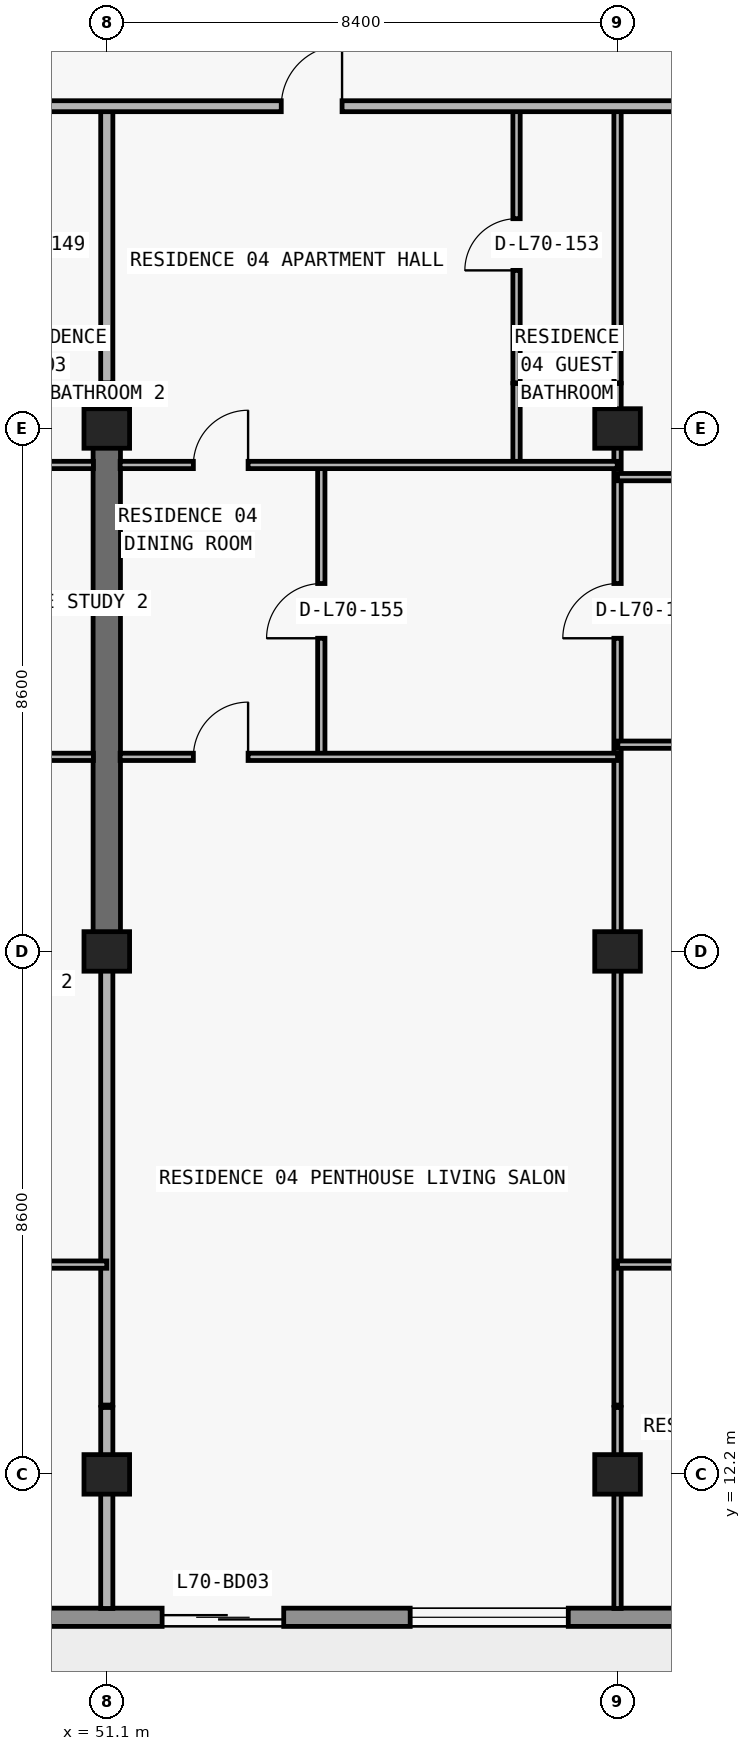
"""IFC4 building model, lengths in metres.
Left out: names, types, materials, properties, quantities, classifications, styles, units other than length and angle.
Written with IfcOpenShell. Run it as: python <this file> out.ifc"""

import sys

from ifc_helpers import new_model, si_unit, direction, frame, frame_2d, origin, origin_2d, place, context, subcontext, project, spatial, rectangle, extrude, element, fill, save


model = new_model("IFC4")
c1 = context("Model", 3, precision=1e-05, world=origin(), true_north=direction((0.0, 1.0)))
c2 = subcontext(c1, "Body", "Model", "MODEL_VIEW")
j1 = project(units=[si_unit("LENGTHUNIT", "METRE"), si_unit("PLANEANGLEUNIT", "RADIAN")], contexts=[c1])
p1 = place(None, origin())
s1 = spatial("IfcSite", under=j1, at=p1, CompositionType="ELEMENT")
p2 = place(p1, origin())
s2 = spatial("IfcBuilding", under=s1, at=p2, CompositionType="ELEMENT")
p3 = place(p2, frame((0.0, 0.0, 249.6)))
s3 = spatial("IfcBuildingStorey", under=s2, at=p3, CompositionType="ELEMENT", Elevation=249.6)
for number, where, z_axis, x_axis in (
    (1, (51.1, 12.2, 0.0), (0.0, 0.0, 1.0), (1.0, 0.0, 0.0)),
    (2, (59.5, 12.2, 0.0), (0.0, 0.0, 1.0), (1.0, 0.0, 0.0)),
    (3, (51.1, 20.8, 0.0), (0.0, 0.0, 1.0), (1.0, 0.0, 0.0)),
    (4, (59.5, 20.8, 0.0), (0.0, 0.0, 1.0), (1.0, 0.0, 0.0)),
    (5, (51.1, 29.4, 0.0), (0.0, 0.0, 1.0), (1.0, 0.0, 0.0)),
    (6, (59.5, 29.4, 0.0), (0.0, 0.0, 1.0), (1.0, 0.0, 0.0)),
):
    element("IfcColumn", number, at=place(p3, frame(where, z_axis=z_axis, x_axis=x_axis)), inside=s3, PredefinedType="COLUMN", context=c2, shape_type="SweptSolid", body=[
        extrude(rectangle(XDim=0.75, YDim=0.65, at=origin_2d()), origin(), (0.0, 0.0, 1.0), 3.05),
    ])
p4 = place(p3, frame((51.1, 20.8, 0.0), z_axis=(0.0, 0.0, 1.0), x_axis=(0.0, 1.0, 0.0)))
e7 = element("IfcWall", 7, at=p4, inside=s3, PredefinedType="SHEAR", context=c2, shape_type="SweptSolid", body=[
    extrude(rectangle(XDim=8.6, YDim=0.45, at=frame_2d((4.3, 0.0))), origin(), (0.0, 0.0, 1.0), 3.05),
])
p5 = place(p3, frame((65.7, 9.85, 0.0), z_axis=(0.0, 0.0, 1.0), x_axis=(-1.0, 0.0, 0.0)))
e8 = element("IfcWall", 8, at=p5, inside=s3, PredefinedType="STANDARD", context=c2, shape_type="SweptSolid", body=[
    extrude(rectangle(XDim=53.6, YDim=0.3, at=frame_2d((26.8, 0.0))), origin(), (0.0, 0.0, 1.0), 3.05),
])
p6 = place(p5, frame((48.05, 0.0, 0.85)))
e9 = element("IfcOpeningElement", 9, at=p6, cuts=e8, PredefinedType="OPENING", context=c2, shape_type="SweptSolid", body=[
    extrude(rectangle(XDim=1.8, YDim=1.55, at=frame_2d((0.9, 0.775))), frame((0.0, 0.16, 0.0), z_axis=(0.0, -1.0, 0.0), x_axis=(1.0, 0.0, 0.0)), (0.0, 0.0, 1.0), 0.32),
])
p7 = place(p5, frame((44.09, 0.0, 0.0)))
e10 = element("IfcOpeningElement", 10, at=p7, cuts=e8, PredefinedType="OPENING", context=c2, shape_type="SweptSolid", body=[
    extrude(rectangle(XDim=2.0, YDim=2.3, at=frame_2d((1.0, 1.15))), frame((0.0, 0.16, 0.0), z_axis=(0.0, -1.0, 0.0), x_axis=(1.0, 0.0, 0.0)), (0.0, 0.0, 1.0), 0.32),
])
p8 = place(p5, frame((39.99, 0.0, 0.85)))
e11 = element("IfcOpeningElement", 11, at=p8, cuts=e8, PredefinedType="OPENING", context=c2, shape_type="SweptSolid", body=[
    extrude(rectangle(XDim=1.8, YDim=1.55, at=frame_2d((0.9, 0.775))), frame((0.0, 0.16, 0.0), z_axis=(0.0, -1.0, 0.0), x_axis=(1.0, 0.0, 0.0)), (0.0, 0.0, 1.0), 0.32),
])
p9 = place(p5, frame((36.09, 0.0, 0.0)))
e12 = element("IfcOpeningElement", 12, at=p9, cuts=e8, PredefinedType="OPENING", context=c2, shape_type="SweptSolid", body=[
    extrude(rectangle(XDim=2.0, YDim=2.3, at=frame_2d((1.0, 1.15))), frame((0.0, 0.16, 0.0), z_axis=(0.0, -1.0, 0.0), x_axis=(1.0, 0.0, 0.0)), (0.0, 0.0, 1.0), 0.32),
])
p10 = place(p5, frame((31.41, 0.0, 0.65)))
e13 = element("IfcOpeningElement", 13, at=p10, cuts=e8, PredefinedType="OPENING", context=c2, shape_type="SweptSolid", body=[
    extrude(rectangle(XDim=2.6, YDim=1.85, at=frame_2d((1.3, 0.925))), frame((0.0, 0.16, 0.0), z_axis=(0.0, -1.0, 0.0), x_axis=(1.0, 0.0, 0.0)), (0.0, 0.0, 1.0), 0.32),
])
p11 = place(p5, frame((25.7, 0.0, 0.85)))
e14 = element("IfcOpeningElement", 14, at=p11, cuts=e8, PredefinedType="OPENING", context=c2, shape_type="SweptSolid", body=[
    extrude(rectangle(XDim=2.2, YDim=1.55, at=frame_2d((1.1, 0.775))), frame((0.0, 0.16, 0.0), z_axis=(0.0, -1.0, 0.0), x_axis=(1.0, 0.0, 0.0)), (0.0, 0.0, 1.0), 0.32),
])
p12 = place(p5, frame((17.7, 0.0, 0.85)))
e15 = element("IfcOpeningElement", 15, at=p12, cuts=e8, PredefinedType="OPENING", context=c2, shape_type="SweptSolid", body=[
    extrude(rectangle(XDim=2.2, YDim=1.55, at=frame_2d((1.1, 0.775))), frame((0.0, 0.16, 0.0), z_axis=(0.0, -1.0, 0.0), x_axis=(1.0, 0.0, 0.0)), (0.0, 0.0, 1.0), 0.32),
])
p13 = place(p5, frame((11.69, 0.0, 0.0)))
e16 = element("IfcOpeningElement", 16, at=p13, cuts=e8, PredefinedType="OPENING", context=c2, shape_type="SweptSolid", body=[
    extrude(rectangle(XDim=2.0, YDim=2.3, at=frame_2d((1.0, 1.15))), frame((0.0, 0.16, 0.0), z_axis=(0.0, -1.0, 0.0), x_axis=(1.0, 0.0, 0.0)), (0.0, 0.0, 1.0), 0.32),
])
p14 = place(p5, frame((7.01, 0.0, 0.65)))
e17 = element("IfcOpeningElement", 17, at=p14, cuts=e8, PredefinedType="OPENING", context=c2, shape_type="SweptSolid", body=[
    extrude(rectangle(XDim=2.6, YDim=1.85, at=frame_2d((1.3, 0.925))), frame((0.0, 0.16, 0.0), z_axis=(0.0, -1.0, 0.0), x_axis=(1.0, 0.0, 0.0)), (0.0, 0.0, 1.0), 0.32),
])
p15 = place(p5, frame((2.0, 0.0, 0.85)))
e18 = element("IfcOpeningElement", 18, at=p15, cuts=e8, PredefinedType="OPENING", context=c2, shape_type="SweptSolid", body=[
    extrude(rectangle(XDim=2.2, YDim=1.55, at=frame_2d((1.1, 0.775))), frame((0.0, 0.16, 0.0), z_axis=(0.0, -1.0, 0.0), x_axis=(1.0, 0.0, 0.0)), (0.0, 0.0, 1.0), 0.32),
])
p16 = place(p3, frame((51.1, 9.995, 0.0), z_axis=(0.0, 0.0, 1.0), x_axis=(0.0, 1.0, 0.0)))
e19 = element("IfcWall", 19, at=p16, inside=s3, PredefinedType="PARTITIONING", context=c2, shape_type="SweptSolid", body=[
    extrude(rectangle(XDim=3.305, YDim=0.2, at=frame_2d((1.652, 0.0))), origin(), (0.0, 0.0, 1.0), 2.263),
])
p17 = place(p3, frame((51.1, 13.34, 0.0), z_axis=(0.0, 0.0, 1.0), x_axis=(0.0, 1.0, 0.0)))
e20 = element("IfcWall", 20, at=p17, inside=s3, PredefinedType="PARTITIONING", context=c2, shape_type="SweptSolid", body=[
    extrude(rectangle(XDim=7.455, YDim=0.2, at=frame_2d((3.728, 0.0))), origin(), (0.0, 0.0, 1.0), 2.263),
])
p18 = place(p3, frame((51.1, 29.405, 0.0), z_axis=(0.0, 0.0, 1.0), x_axis=(0.0, 1.0, 0.0)))
e21 = element("IfcWall", 21, at=p18, inside=s3, PredefinedType="PARTITIONING", context=c2, shape_type="SweptSolid", body=[
    extrude(rectangle(XDim=0.735, YDim=0.2, at=frame_2d((0.367, 0.0))), origin(), (0.0, 0.0, 1.0), 2.335),
])
p19 = place(p3, frame((51.1, 30.15, 0.0), z_axis=(0.0, 0.0, 1.0), x_axis=(0.0, 1.0, 0.0)))
e22 = element("IfcWall", 22, at=p19, inside=s3, PredefinedType="PARTITIONING", context=c2, shape_type="SweptSolid", body=[
    extrude(rectangle(XDim=4.55, YDim=0.2, at=frame_2d((2.275, 0.0))), origin(), (0.0, 0.0, 1.0), 2.335),
])
p20 = place(p3, frame((54.628, 24.0, 0.0), z_axis=(0.0, 0.0, 1.0), x_axis=(0.0, 1.0, 0.0)))
e23 = element("IfcWall", 23, at=p20, inside=s3, PredefinedType="PARTITIONING", context=c2, shape_type="SweptSolid", body=[
    extrude(rectangle(XDim=4.8, YDim=0.12, at=frame_2d((2.4, 0.0))), origin(), (0.0, 0.0, 1.0), 3.05),
])
p21 = place(p20, frame((1.95, 0.0, 0.0)))
e24 = element("IfcOpeningElement", 24, at=p21, cuts=e23, PredefinedType="OPENING", context=c2, shape_type="SweptSolid", body=[
    extrude(rectangle(XDim=0.9, YDim=2.15, at=frame_2d((0.45, 1.075))), frame((0.0, 0.07, 0.0), z_axis=(0.0, -1.0, 0.0), x_axis=(1.0, 0.0, 0.0)), (0.0, 0.0, 1.0), 0.14),
])
p22 = place(p3, frame((57.839, 28.8, 0.0), z_axis=(0.0, 0.0, 1.0), x_axis=(0.0, 1.0, 0.0)))
e25 = element("IfcWall", 25, at=p22, inside=s3, PredefinedType="PARTITIONING", context=c2, shape_type="SweptSolid", body=[
    extrude(rectangle(XDim=1.34, YDim=0.12, at=frame_2d((0.67, 0.0))), origin(), (0.0, 0.0, 1.0), 3.05),
])
p23 = place(p3, frame((57.839, 30.15, 0.0), z_axis=(0.0, 0.0, 1.0), x_axis=(0.0, 1.0, 0.0)))
e26 = element("IfcWall", 26, at=p23, inside=s3, PredefinedType="PARTITIONING", context=c2, shape_type="SweptSolid", body=[
    extrude(rectangle(XDim=4.55, YDim=0.12, at=frame_2d((2.275, 0.0))), origin(), (0.0, 0.0, 1.0), 3.05),
])
p24 = place(p23, frame((1.85, 0.0, 0.0)))
e27 = element("IfcOpeningElement", 27, at=p24, cuts=e26, PredefinedType="OPENING", context=c2, shape_type="SweptSolid", body=[
    extrude(rectangle(XDim=0.85, YDim=2.1, at=frame_2d((0.425, 1.05))), frame((0.0, 0.07, 0.0), z_axis=(0.0, -1.0, 0.0), x_axis=(1.0, 0.0, 0.0)), (0.0, 0.0, 1.0), 0.14),
])
p25 = place(p3, frame((59.5, 9.995, 0.0), z_axis=(0.0, 0.0, 1.0), x_axis=(0.0, 1.0, 0.0)))
e28 = element("IfcWall", 28, at=p25, inside=s3, PredefinedType="PARTITIONING", context=c2, shape_type="SweptSolid", body=[
    extrude(rectangle(XDim=3.305, YDim=0.12, at=frame_2d((1.652, 0.0))), origin(), (0.0, 0.0, 1.0), 2.263),
])
p26 = place(p3, frame((59.5, 13.34, 0.0), z_axis=(0.0, 0.0, 1.0), x_axis=(0.0, 1.0, 0.0)))
e29 = element("IfcWall", 29, at=p26, inside=s3, PredefinedType="PARTITIONING", context=c2, shape_type="SweptSolid", body=[
    extrude(rectangle(XDim=16.8, YDim=0.12, at=frame_2d((8.4, 0.0))), origin(), (0.0, 0.0, 1.0), 2.263),
])
p27 = place(p26, frame((12.61, 0.0, 0.0)))
e30 = element("IfcOpeningElement", 30, at=p27, cuts=e29, PredefinedType="OPENING", context=c2, shape_type="SweptSolid", body=[
    extrude(rectangle(XDim=0.9, YDim=2.15, at=frame_2d((0.45, 1.075))), frame((0.0, 0.07, 0.0), z_axis=(0.0, -1.0, 0.0), x_axis=(1.0, 0.0, 0.0)), (0.0, 0.0, 1.0), 0.14),
])
p28 = place(p3, frame((59.5, 30.15, 0.0), z_axis=(0.0, 0.0, 1.0), x_axis=(0.0, 1.0, 0.0)))
e31 = element("IfcWall", 31, at=p28, inside=s3, PredefinedType="PARTITIONING", context=c2, shape_type="SweptSolid", body=[
    extrude(rectangle(XDim=4.55, YDim=0.12, at=frame_2d((2.275, 0.0))), origin(), (0.0, 0.0, 1.0), 2.263),
])
p29 = place(p3, frame((35.1, 15.65, 0.0), z_axis=(0.0, 0.0, 1.0), x_axis=(1.0, 0.0, 0.0)))
e32 = element("IfcWall", 32, at=p29, inside=s3, PredefinedType="PARTITIONING", context=c2, shape_type="SweptSolid", body=[
    extrude(rectangle(XDim=16.0, YDim=0.12, at=frame_2d((8.0, 0.0))), origin(), (0.0, 0.0, 1.0), 3.05),
])
p30 = place(p29, frame((3.35, 0.0, 0.0)))
e33 = element("IfcOpeningElement", 33, at=p30, cuts=e32, PredefinedType="OPENING", context=c2, shape_type="SweptSolid", body=[
    extrude(rectangle(XDim=0.9, YDim=2.15, at=frame_2d((0.45, 1.075))), frame((0.0, 0.07, 0.0), z_axis=(0.0, -1.0, 0.0), x_axis=(1.0, 0.0, 0.0)), (0.0, 0.0, 1.0), 0.14),
])
p31 = place(p29, frame((11.35, 0.0, 0.0)))
e34 = element("IfcOpeningElement", 34, at=p31, cuts=e32, PredefinedType="OPENING", context=c2, shape_type="SweptSolid", body=[
    extrude(rectangle(XDim=0.9, YDim=2.15, at=frame_2d((0.45, 1.075))), frame((0.0, 0.07, 0.0), z_axis=(0.0, -1.0, 0.0), x_axis=(1.0, 0.0, 0.0)), (0.0, 0.0, 1.0), 0.14),
])
p32 = place(p3, frame((59.5, 15.65, 0.0), z_axis=(0.0, 0.0, 1.0), x_axis=(1.0, 0.0, 0.0)))
e35 = element("IfcWall", 35, at=p32, inside=s3, PredefinedType="PARTITIONING", context=c2, shape_type="SweptSolid", body=[
    extrude(rectangle(XDim=6.2, YDim=0.12, at=frame_2d((3.1, 0.0))), origin(), (0.0, 0.0, 1.0), 3.05),
])
p33 = place(p32, frame((2.65, 0.0, 0.0)))
e36 = element("IfcOpeningElement", 36, at=p33, cuts=e35, PredefinedType="OPENING", context=c2, shape_type="SweptSolid", body=[
    extrude(rectangle(XDim=0.9, YDim=2.15, at=frame_2d((0.45, 1.075))), frame((0.0, 0.07, 0.0), z_axis=(0.0, -1.0, 0.0), x_axis=(1.0, 0.0, 0.0)), (0.0, 0.0, 1.0), 0.14),
])
p34 = place(p3, frame((42.7, 24.0, 0.0), z_axis=(0.0, 0.0, 1.0), x_axis=(1.0, 0.0, 0.0)))
e37 = element("IfcWall", 37, at=p34, inside=s3, PredefinedType="PARTITIONING", context=c2, shape_type="SweptSolid", body=[
    extrude(rectangle(XDim=8.18, YDim=0.12, at=frame_2d((4.09, 0.0))), origin(), (0.0, 0.0, 1.0), 3.05),
])
p35 = place(p34, frame((3.64, 0.0, 0.0)))
e38 = element("IfcOpeningElement", 38, at=p35, cuts=e37, PredefinedType="OPENING", context=c2, shape_type="SweptSolid", body=[
    extrude(rectangle(XDim=0.9, YDim=2.15, at=frame_2d((0.45, 1.075))), frame((0.0, 0.07, 0.0), z_axis=(0.0, -1.0, 0.0), x_axis=(1.0, 0.0, 0.0)), (0.0, 0.0, 1.0), 0.14),
])
p36 = place(p3, frame((51.32, 24.0, 0.0), z_axis=(0.0, 0.0, 1.0), x_axis=(1.0, 0.0, 0.0)))
e39 = element("IfcWall", 39, at=p36, inside=s3, PredefinedType="PARTITIONING", context=c2, shape_type="SweptSolid", body=[
    extrude(rectangle(XDim=8.18, YDim=0.12, at=frame_2d((4.09, 0.0))), origin(), (0.0, 0.0, 1.0), 3.05),
])
p37 = place(p36, frame((1.204, 0.0, 0.0)))
e40 = element("IfcOpeningElement", 40, at=p37, cuts=e39, PredefinedType="OPENING", context=c2, shape_type="SweptSolid", body=[
    extrude(rectangle(XDim=0.9, YDim=2.15, at=frame_2d((0.45, 1.075))), frame((0.0, 0.07, 0.0), z_axis=(0.0, -1.0, 0.0), x_axis=(1.0, 0.0, 0.0)), (0.0, 0.0, 1.0), 0.14),
])
p38 = place(p3, frame((59.505, 24.2, 0.0), z_axis=(0.0, 0.0, 1.0), x_axis=(1.0, 0.0, 0.0)))
e41 = element("IfcWall", 41, at=p38, inside=s3, PredefinedType="PARTITIONING", context=c2, shape_type="SweptSolid", body=[
    extrude(rectangle(XDim=6.195, YDim=0.12, at=frame_2d((3.098, 0.0))), origin(), (0.0, 0.0, 1.0), 3.05),
])
p39 = place(p38, frame((2.647, 0.0, 0.0)))
e42 = element("IfcOpeningElement", 42, at=p39, cuts=e41, PredefinedType="OPENING", context=c2, shape_type="SweptSolid", body=[
    extrude(rectangle(XDim=0.9, YDim=2.15, at=frame_2d((0.45, 1.075))), frame((0.0, 0.07, 0.0), z_axis=(0.0, -1.0, 0.0), x_axis=(1.0, 0.0, 0.0)), (0.0, 0.0, 1.0), 0.14),
])
p40 = place(p3, frame((59.5, 28.6, 0.0), z_axis=(0.0, 0.0, 1.0), x_axis=(1.0, 0.0, 0.0)))
e43 = element("IfcWall", 43, at=p40, inside=s3, PredefinedType="PARTITIONING", context=c2, shape_type="SweptSolid", body=[
    extrude(rectangle(XDim=6.2, YDim=0.12, at=frame_2d((3.1, 0.0))), origin(), (0.0, 0.0, 1.0), 3.05),
])
p41 = place(p40, frame((1.822, 0.0, 0.0)))
e44 = element("IfcOpeningElement", 44, at=p41, cuts=e43, PredefinedType="OPENING", context=c2, shape_type="SweptSolid", body=[
    extrude(rectangle(XDim=0.9, YDim=2.15, at=frame_2d((0.45, 1.075))), frame((0.0, 0.07, 0.0), z_axis=(0.0, -1.0, 0.0), x_axis=(1.0, 0.0, 0.0)), (0.0, 0.0, 1.0), 0.14),
])
p42 = place(p3, frame((42.705, 28.8, 0.0), z_axis=(0.0, 0.0, 1.0), x_axis=(1.0, 0.0, 0.0)))
e45 = element("IfcWall", 45, at=p42, inside=s3, PredefinedType="PARTITIONING", context=c2, shape_type="SweptSolid", body=[
    extrude(rectangle(XDim=8.175, YDim=0.12, at=frame_2d((4.087, 0.0))), origin(), (0.0, 0.0, 1.0), 3.05),
])
p43 = place(p42, frame((2.892, 0.0, 0.0)))
e46 = element("IfcOpeningElement", 46, at=p43, cuts=e45, PredefinedType="OPENING", context=c2, shape_type="SweptSolid", body=[
    extrude(rectangle(XDim=0.9, YDim=2.15, at=frame_2d((0.45, 1.075))), frame((0.0, 0.07, 0.0), z_axis=(0.0, -1.0, 0.0), x_axis=(1.0, 0.0, 0.0)), (0.0, 0.0, 1.0), 0.14),
])
p44 = place(p3, frame((51.32, 28.8, 0.0), z_axis=(0.0, 0.0, 1.0), x_axis=(1.0, 0.0, 0.0)))
e47 = element("IfcWall", 47, at=p44, inside=s3, PredefinedType="PARTITIONING", context=c2, shape_type="SweptSolid", body=[
    extrude(rectangle(XDim=8.175, YDim=0.12, at=frame_2d((4.087, 0.0))), origin(), (0.0, 0.0, 1.0), 3.05),
])
p45 = place(p44, frame((1.204, 0.0, 0.0)))
e48 = element("IfcOpeningElement", 48, at=p45, cuts=e47, PredefinedType="OPENING", context=c2, shape_type="SweptSolid", body=[
    extrude(rectangle(XDim=0.9, YDim=2.15, at=frame_2d((0.45, 1.075))), frame((0.0, 0.07, 0.0), z_axis=(0.0, -1.0, 0.0), x_axis=(1.0, 0.0, 0.0)), (0.0, 0.0, 1.0), 0.14),
])
p46 = place(p3, frame((26.7, 34.7, 0.0), z_axis=(0.0, 0.0, 1.0), x_axis=(1.0, 0.0, 0.0)))
e49 = element("IfcWall", 49, at=p46, inside=s3, PredefinedType="PARTITIONING", context=c2, shape_type="SweptSolid", body=[
    extrude(rectangle(XDim=39.0, YDim=0.18, at=frame_2d((19.5, 0.0))), origin(), (0.0, 0.0, 1.0), 3.05),
])
p47 = place(p46, frame((2.827, 0.0, 0.0)))
e50 = element("IfcOpeningElement", 50, at=p47, cuts=e49, PredefinedType="OPENING", context=c2, shape_type="SweptSolid", body=[
    extrude(rectangle(XDim=1.0, YDim=2.2, at=frame_2d((0.5, 1.1))), frame((0.0, 0.1, 0.0), z_axis=(0.0, -1.0, 0.0), x_axis=(1.0, 0.0, 0.0)), (0.0, 0.0, 1.0), 0.2),
])
p48 = place(p46, frame((27.27, 0.0, 0.0)))
e51 = element("IfcOpeningElement", 51, at=p48, cuts=e49, PredefinedType="OPENING", context=c2, shape_type="SweptSolid", body=[
    extrude(rectangle(XDim=1.0, YDim=2.2, at=frame_2d((0.5, 1.1))), frame((0.0, 0.1, 0.0), z_axis=(0.0, -1.0, 0.0), x_axis=(1.0, 0.0, 0.0)), (0.0, 0.0, 1.0), 0.2),
])
p49 = place(p13, origin())
e52 = element("IfcDoor", 52, at=p49, inside=s3, OperationType="DOUBLE_DOOR_SLIDING", PredefinedType="DOOR", context=c2, shape_type="SweptSolid", body=[
    extrude(rectangle(XDim=2.0, YDim=2.3, at=frame_2d((1.0, 1.15))), frame((0.0, 0.025, 0.0), z_axis=(0.0, -1.0, 0.0), x_axis=(1.0, 0.0, 0.0)), (0.0, 0.0, 1.0), 0.05),
])
fill(e16, e52)
p50 = place(p14, origin())
e53 = element("IfcWindow", 53, at=p50, inside=s3, PartitioningType="SINGLE_PANEL", PredefinedType="WINDOW", context=c2, shape_type="SweptSolid", body=[
    extrude(rectangle(XDim=2.6, YDim=1.85, at=frame_2d((1.3, 0.925))), frame((0.0, 0.03, 0.0), z_axis=(0.0, -1.0, 0.0), x_axis=(1.0, 0.0, 0.0)), (0.0, 0.0, 1.0), 0.06),
])
fill(e17, e53)
p51 = place(p48, origin())
e54 = element("IfcDoor", 54, at=p51, inside=s3, OperationType="SINGLE_SWING_RIGHT", PredefinedType="DOOR", context=c2, shape_type="SweptSolid", body=[
    extrude(rectangle(XDim=1.0, YDim=2.2, at=frame_2d((0.5, 1.1))), frame((0.0, 0.025, 0.0), z_axis=(0.0, -1.0, 0.0), x_axis=(1.0, 0.0, 0.0)), (0.0, 0.0, 1.0), 0.05),
])
fill(e51, e54)
p52 = place(p24, origin())
e55 = element("IfcDoor", 55, at=p52, inside=s3, OperationType="SINGLE_SWING_LEFT", PredefinedType="DOOR", context=c2, shape_type="SweptSolid", body=[
    extrude(rectangle(XDim=0.85, YDim=2.1, at=frame_2d((0.425, 1.05))), frame((0.0, 0.025, 0.0), z_axis=(0.0, -1.0, 0.0), x_axis=(1.0, 0.0, 0.0)), (0.0, 0.0, 1.0), 0.05),
])
fill(e27, e55)
p53 = place(p45, origin())
e56 = element("IfcDoor", 56, at=p53, inside=s3, OperationType="SINGLE_SWING_RIGHT", PredefinedType="DOOR", context=c2, shape_type="SweptSolid", body=[
    extrude(rectangle(XDim=0.9, YDim=2.15, at=frame_2d((0.45, 1.075))), frame((0.0, 0.025, 0.0), z_axis=(0.0, -1.0, 0.0), x_axis=(1.0, 0.0, 0.0)), (0.0, 0.0, 1.0), 0.05),
])
fill(e48, e56)
p54 = place(p21, origin())
e57 = element("IfcDoor", 57, at=p54, inside=s3, OperationType="SINGLE_SWING_LEFT", PredefinedType="DOOR", context=c2, shape_type="SweptSolid", body=[
    extrude(rectangle(XDim=0.9, YDim=2.15, at=frame_2d((0.45, 1.075))), frame((0.0, 0.025, 0.0), z_axis=(0.0, -1.0, 0.0), x_axis=(1.0, 0.0, 0.0)), (0.0, 0.0, 1.0), 0.05),
])
fill(e24, e57)
p55 = place(p37, origin())
e58 = element("IfcDoor", 58, at=p55, inside=s3, OperationType="SINGLE_SWING_RIGHT", PredefinedType="DOOR", context=c2, shape_type="SweptSolid", body=[
    extrude(rectangle(XDim=0.9, YDim=2.15, at=frame_2d((0.45, 1.075))), frame((0.0, 0.025, 0.0), z_axis=(0.0, -1.0, 0.0), x_axis=(1.0, 0.0, 0.0)), (0.0, 0.0, 1.0), 0.05),
])
fill(e40, e58)
p56 = place(p27, origin())
e59 = element("IfcDoor", 59, at=p56, inside=s3, OperationType="SINGLE_SWING_LEFT", PredefinedType="DOOR", context=c2, shape_type="SweptSolid", body=[
    extrude(rectangle(XDim=0.9, YDim=2.15, at=frame_2d((0.45, 1.075))), frame((0.0, 0.025, 0.0), z_axis=(0.0, -1.0, 0.0), x_axis=(1.0, 0.0, 0.0)), (0.0, 0.0, 1.0), 0.05),
])
fill(e30, e59)
save(model, sys.argv[1])
